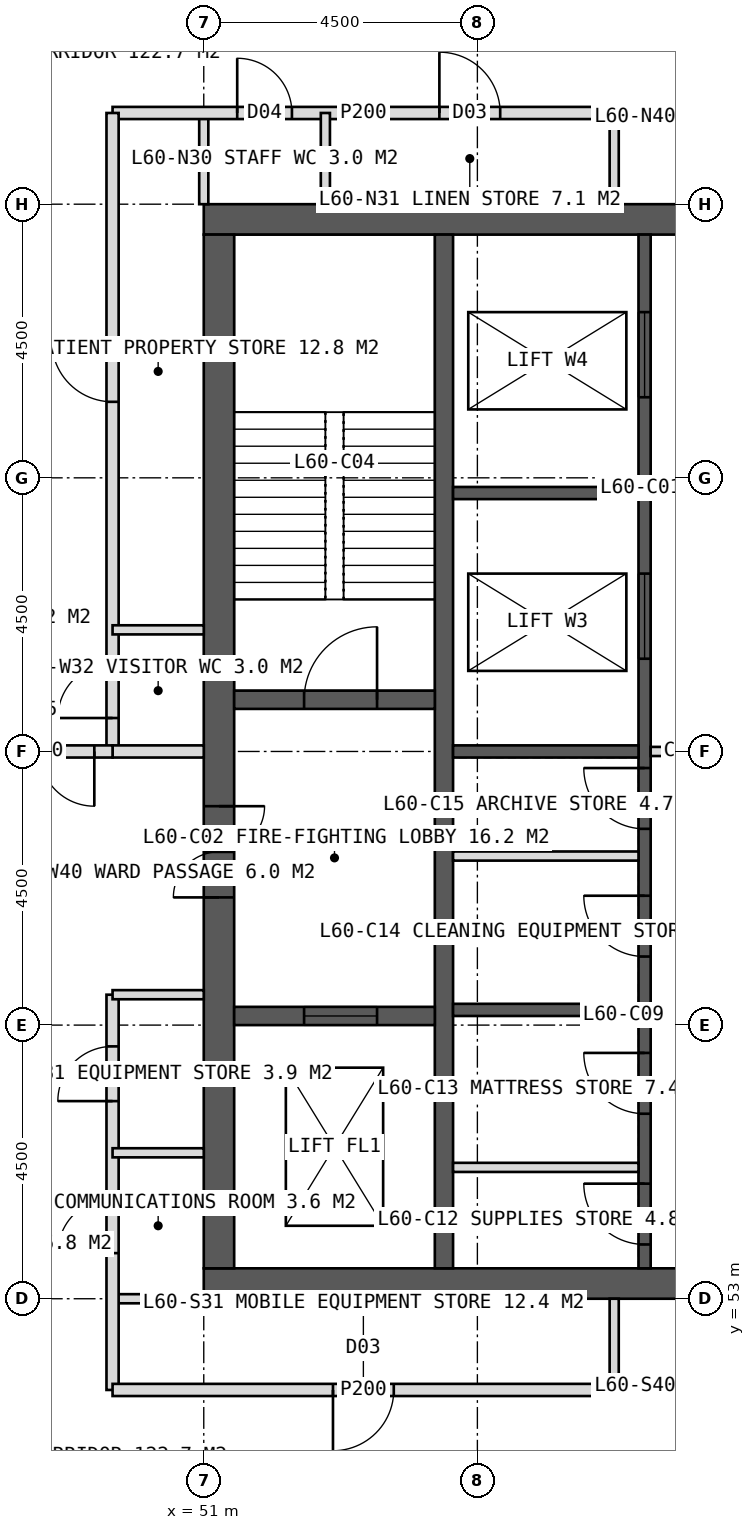
"""IFC4 building model, lengths in metres.
Left out: names, types, materials, properties, quantities, classifications, styles, units other than length and angle.
Written with IfcOpenShell. Run it as: python <this file> out.ifc"""

import sys

from ifc_helpers import new_model, si_unit, direction, frame, frame_2d, origin, place, context, subcontext, project, spatial, rectangle, extrude, element, fill, save


model = new_model("IFC4")
c1 = context("Model", 3, precision=1e-05, world=origin(), true_north=direction((0.0, 1.0)))
c2 = subcontext(c1, "Body", "Model", "MODEL_VIEW")
j1 = project(units=[si_unit("LENGTHUNIT", "METRE"), si_unit("PLANEANGLEUNIT", "RADIAN")], contexts=[c1])
p1 = place(None, origin())
s1 = spatial("IfcSite", under=j1, at=p1, CompositionType="ELEMENT")
p2 = place(p1, origin())
s2 = spatial("IfcBuilding", under=s1, at=p2, CompositionType="ELEMENT")
p3 = place(p2, frame((0.0, 0.0, 250.0)))
s3 = spatial("IfcBuildingStorey", under=s2, at=p3, CompositionType="ELEMENT", Elevation=250.0)
p4 = place(p3, frame((51.0, 70.75, 0.0), z_axis=(0.0, 0.0, 1.0), x_axis=(1.0, 0.0, 0.0)))
e1 = element("IfcWall", 1, at=p4, inside=s3, PredefinedType="SHEAR", context=c2, shape_type="SweptSolid", body=[
    extrude(rectangle(XDim=18.0, YDim=0.5, at=frame_2d((9.0, 0.0))), origin(), (0.0, 0.0, 1.0), 4.0),
])
p5 = place(p4, frame((8.1, 0.0, 0.0)))
e2 = element("IfcOpeningElement", 2, at=p5, cuts=e1, PredefinedType="OPENING", context=c2, shape_type="SweptSolid", body=[
    extrude(rectangle(XDim=1.8, YDim=2.2, at=frame_2d((0.9, 1.1))), frame((0.0, 0.26, 0.0), z_axis=(0.0, -1.0, 0.0), x_axis=(1.0, 0.0, 0.0)), (0.0, 0.0, 1.0), 0.52),
])
p6 = place(p3, frame((51.0, 53.25, 0.0), z_axis=(0.0, 0.0, 1.0), x_axis=(1.0, 0.0, 0.0)))
e3 = element("IfcWall", 3, at=p6, inside=s3, PredefinedType="SHEAR", context=c2, shape_type="SweptSolid", body=[
    extrude(rectangle(XDim=18.0, YDim=0.5, at=frame_2d((9.0, 0.0))), origin(), (0.0, 0.0, 1.0), 4.0),
])
p7 = place(p6, frame((8.1, 0.0, 0.0)))
e4 = element("IfcOpeningElement", 4, at=p7, cuts=e3, PredefinedType="OPENING", context=c2, shape_type="SweptSolid", body=[
    extrude(rectangle(XDim=1.8, YDim=2.2, at=frame_2d((0.9, 1.1))), frame((0.0, 0.26, 0.0), z_axis=(0.0, -1.0, 0.0), x_axis=(1.0, 0.0, 0.0)), (0.0, 0.0, 1.0), 0.52),
])
p8 = place(p3, frame((51.25, 53.5, 0.0), z_axis=(0.0, 0.0, 1.0), x_axis=(0.0, 1.0, 0.0)))
e5 = element("IfcWall", 5, at=p8, inside=s3, PredefinedType="SHEAR", context=c2, shape_type="SweptSolid", body=[
    extrude(rectangle(XDim=17.0, YDim=0.5, at=frame_2d((8.5, 0.0))), origin(), (0.0, 0.0, 1.0), 4.0),
])
p9 = place(p8, frame((6.1, 0.0, 0.0)))
e6 = element("IfcOpeningElement", 6, at=p9, cuts=e5, PredefinedType="OPENING", context=c2, shape_type="SweptSolid", body=[
    extrude(rectangle(XDim=1.5, YDim=2.2, at=frame_2d((0.75, 1.1))), frame((0.0, 0.26, 0.0), z_axis=(0.0, -1.0, 0.0), x_axis=(1.0, 0.0, 0.0)), (0.0, 0.0, 1.0), 0.52),
])
p10 = place(p3, frame((54.95, 53.5, 0.0), z_axis=(0.0, 0.0, 1.0), x_axis=(0.0, 1.0, 0.0)))
e7 = element("IfcWall", 7, at=p10, inside=s3, PredefinedType="SHEAR", context=c2, shape_type="SweptSolid", body=[
    extrude(rectangle(XDim=17.0, YDim=0.3, at=frame_2d((8.5, 0.0))), origin(), (0.0, 0.0, 1.0), 4.0),
])
p11 = place(p3, frame((58.25, 53.5, 0.0), z_axis=(0.0, 0.0, 1.0), x_axis=(0.0, 1.0, 0.0)))
e8 = element("IfcWall", 8, at=p11, inside=s3, PredefinedType="SHEAR", context=c2, shape_type="SweptSolid", body=[
    extrude(rectangle(XDim=17.0, YDim=0.2, at=frame_2d((8.5, 0.0))), origin(), (0.0, 0.0, 1.0), 4.0),
])
p12 = place(p11, frame((0.393, 0.0, 0.0)))
e9 = element("IfcOpeningElement", 9, at=p12, cuts=e8, PredefinedType="OPENING", context=c2, shape_type="SweptSolid", body=[
    extrude(rectangle(XDim=1.0, YDim=2.1, at=frame_2d((0.5, 1.05))), frame((0.0, 0.11, 0.0), z_axis=(0.0, -1.0, 0.0), x_axis=(1.0, 0.0, 0.0)), (0.0, 0.0, 1.0), 0.22),
])
p13 = place(p11, frame((2.542, 0.0, 0.0)))
e10 = element("IfcOpeningElement", 10, at=p13, cuts=e8, PredefinedType="OPENING", context=c2, shape_type="SweptSolid", body=[
    extrude(rectangle(XDim=1.0, YDim=2.1, at=frame_2d((0.5, 1.05))), frame((0.0, 0.11, 0.0), z_axis=(0.0, -1.0, 0.0), x_axis=(1.0, 0.0, 0.0)), (0.0, 0.0, 1.0), 0.22),
])
p14 = place(p11, frame((5.127, 0.0, 0.0)))
e11 = element("IfcOpeningElement", 11, at=p14, cuts=e8, PredefinedType="OPENING", context=c2, shape_type="SweptSolid", body=[
    extrude(rectangle(XDim=1.0, YDim=2.1, at=frame_2d((0.5, 1.05))), frame((0.0, 0.11, 0.0), z_axis=(0.0, -1.0, 0.0), x_axis=(1.0, 0.0, 0.0)), (0.0, 0.0, 1.0), 0.22),
])
p15 = place(p11, frame((7.228, 0.0, 0.0)))
e12 = element("IfcOpeningElement", 12, at=p15, cuts=e8, PredefinedType="OPENING", context=c2, shape_type="SweptSolid", body=[
    extrude(rectangle(XDim=1.0, YDim=2.1, at=frame_2d((0.5, 1.05))), frame((0.0, 0.11, 0.0), z_axis=(0.0, -1.0, 0.0), x_axis=(1.0, 0.0, 0.0)), (0.0, 0.0, 1.0), 0.22),
])
p16 = place(p11, frame((10.025, 0.0, 0.0)))
e13 = element("IfcOpeningElement", 13, at=p16, cuts=e8, PredefinedType="OPENING", context=c2, shape_type="SweptSolid", body=[
    extrude(rectangle(XDim=1.4, YDim=2.2, at=frame_2d((0.7, 1.1))), frame((0.0, 0.11, 0.0), z_axis=(0.0, -1.0, 0.0), x_axis=(1.0, 0.0, 0.0)), (0.0, 0.0, 1.0), 0.22),
])
p17 = place(p11, frame((14.325, 0.0, 0.0)))
e14 = element("IfcOpeningElement", 14, at=p17, cuts=e8, PredefinedType="OPENING", context=c2, shape_type="SweptSolid", body=[
    extrude(rectangle(XDim=1.4, YDim=2.2, at=frame_2d((0.7, 1.1))), frame((0.0, 0.11, 0.0), z_axis=(0.0, -1.0, 0.0), x_axis=(1.0, 0.0, 0.0)), (0.0, 0.0, 1.0), 0.22),
])
for number, where, z_axis, x_axis in (
    (15, (55.1, 57.75, 0.0), (0.0, 0.0, 1.0), (1.0, 0.0, 0.0)),
    (16, (55.1, 62.0, 0.0), (0.0, 0.0, 1.0), (1.0, 0.0, 0.0)),
    (17, (55.1, 66.25, 0.0), (0.0, 0.0, 1.0), (1.0, 0.0, 0.0)),
):
    element("IfcWall", number, at=place(p3, frame(where, z_axis=z_axis, x_axis=x_axis)), inside=s3, PredefinedType="SHEAR", context=c2, shape_type="SweptSolid", body=[
        extrude(rectangle(XDim=3.05, YDim=0.2, at=frame_2d((1.525, 0.0))), origin(), (0.0, 0.0, 1.0), 4.0),
    ])
p18 = place(p3, frame((51.5, 62.85, 0.0), z_axis=(0.0, 0.0, 1.0), x_axis=(1.0, 0.0, 0.0)))
e18 = element("IfcWall", 18, at=p18, inside=s3, PredefinedType="SHEAR", context=c2, shape_type="SweptSolid", body=[
    extrude(rectangle(XDim=3.3, YDim=0.3, at=frame_2d((1.65, 0.0))), origin(), (0.0, 0.0, 1.0), 4.0),
])
p19 = place(p18, frame((1.15, 0.0, 0.0)))
e19 = element("IfcOpeningElement", 19, at=p19, cuts=e18, PredefinedType="OPENING", context=c2, shape_type="SweptSolid", body=[
    extrude(rectangle(XDim=1.2, YDim=2.1, at=frame_2d((0.6, 1.05))), frame((0.0, 0.16, 0.0), z_axis=(0.0, -1.0, 0.0), x_axis=(1.0, 0.0, 0.0)), (0.0, 0.0, 1.0), 0.32),
])
p20 = place(p3, frame((51.5, 57.65, 0.0), z_axis=(0.0, 0.0, 1.0), x_axis=(1.0, 0.0, 0.0)))
e20 = element("IfcWall", 20, at=p20, inside=s3, PredefinedType="SHEAR", context=c2, shape_type="SweptSolid", body=[
    extrude(rectangle(XDim=3.3, YDim=0.3, at=frame_2d((1.65, 0.0))), origin(), (0.0, 0.0, 1.0), 4.0),
])
p21 = place(p20, frame((1.15, 0.0, 0.0)))
e21 = element("IfcOpeningElement", 21, at=p21, cuts=e20, PredefinedType="OPENING", context=c2, shape_type="SweptSolid", body=[
    extrude(rectangle(XDim=1.2, YDim=2.2, at=frame_2d((0.6, 1.1))), frame((0.0, 0.16, 0.0), z_axis=(0.0, -1.0, 0.0), x_axis=(1.0, 0.0, 0.0)), (0.0, 0.0, 1.0), 0.32),
])
p22 = place(p3, frame((51.0, 71.0, 0.0), z_axis=(0.0, 0.0, 1.0), x_axis=(0.0, 1.0, 0.0)))
e22 = element("IfcWall", 22, at=p22, inside=s3, PredefinedType="PARTITIONING", context=c2, shape_type="SweptSolid", body=[
    extrude(rectangle(XDim=1.5, YDim=0.15, at=frame_2d((0.75, 0.0))), origin(), (0.0, 0.0, 1.0), 3.75),
])
p23 = place(p3, frame((49.5, 72.5, 0.0), z_axis=(0.0, 0.0, 1.0), x_axis=(1.0, 0.0, 0.0)))
e23 = element("IfcWall", 23, at=p23, inside=s3, PredefinedType="PARTITIONING", context=c2, shape_type="SweptSolid", body=[
    extrude(rectangle(XDim=8.25, YDim=0.2, at=frame_2d((4.125, 0.0))), origin(), (0.0, 0.0, 1.0), 3.75),
])
p24 = place(p23, frame((2.05, 0.0, 0.0)))
e24 = element("IfcOpeningElement", 24, at=p24, cuts=e23, PredefinedType="OPENING", context=c2, shape_type="SweptSolid", body=[
    extrude(rectangle(XDim=0.9, YDim=2.1, at=frame_2d((0.45, 1.05))), frame((0.0, 0.11, 0.0), z_axis=(0.0, -1.0, 0.0), x_axis=(1.0, 0.0, 0.0)), (0.0, 0.0, 1.0), 0.22),
])
p25 = place(p23, frame((5.375, 0.0, 0.0)))
e25 = element("IfcOpeningElement", 25, at=p25, cuts=e23, PredefinedType="OPENING", context=c2, shape_type="SweptSolid", body=[
    extrude(rectangle(XDim=1.0, YDim=2.1, at=frame_2d((0.5, 1.05))), frame((0.0, 0.11, 0.0), z_axis=(0.0, -1.0, 0.0), x_axis=(1.0, 0.0, 0.0)), (0.0, 0.0, 1.0), 0.22),
])
for number, where, z_axis, x_axis in (
    (26, (57.75, 71.0, 0.0), (0.0, 0.0, 1.0), (0.0, 1.0, 0.0)),
    (27, (53.0, 71.0, 0.0), (0.0, 0.0, 1.0), (0.0, 1.0, 0.0)),
    (28, (51.0, 53.0, 0.0), (0.0, 0.0, 1.0), (-1.0, 0.0, 0.0)),
):
    element("IfcWall", number, at=place(p3, frame(where, z_axis=z_axis, x_axis=x_axis)), inside=s3, PredefinedType="PARTITIONING", context=c2, shape_type="SweptSolid", body=[
        extrude(rectangle(XDim=1.5, YDim=0.15, at=frame_2d((0.75, 0.0))), origin(), (0.0, 0.0, 1.0), 3.75),
    ])
p26 = place(p3, frame((49.5, 51.5, 0.0), z_axis=(0.0, 0.0, 1.0), x_axis=(0.0, 1.0, 0.0)))
e29 = element("IfcWall", 29, at=p26, inside=s3, PredefinedType="PARTITIONING", context=c2, shape_type="SweptSolid", body=[
    extrude(rectangle(XDim=6.5, YDim=0.2, at=frame_2d((3.25, 0.0))), origin(), (0.0, 0.0, 1.0), 3.75),
])
p27 = place(p26, frame((2.25, 0.0, 0.0)))
e30 = element("IfcOpeningElement", 30, at=p27, cuts=e29, PredefinedType="OPENING", context=c2, shape_type="SweptSolid", body=[
    extrude(rectangle(XDim=0.9, YDim=2.1, at=frame_2d((0.45, 1.05))), frame((0.0, 0.11, 0.0), z_axis=(0.0, -1.0, 0.0), x_axis=(1.0, 0.0, 0.0)), (0.0, 0.0, 1.0), 0.22),
])
p28 = place(p26, frame((4.75, 0.0, 0.0)))
e31 = element("IfcOpeningElement", 31, at=p28, cuts=e29, PredefinedType="OPENING", context=c2, shape_type="SweptSolid", body=[
    extrude(rectangle(XDim=0.9, YDim=2.1, at=frame_2d((0.45, 1.05))), frame((0.0, 0.11, 0.0), z_axis=(0.0, -1.0, 0.0), x_axis=(1.0, 0.0, 0.0)), (0.0, 0.0, 1.0), 0.22),
])
p29 = place(p3, frame((49.5, 62.0, 0.0), z_axis=(0.0, 0.0, 1.0), x_axis=(0.0, 1.0, 0.0)))
e32 = element("IfcWall", 32, at=p29, inside=s3, PredefinedType="PARTITIONING", context=c2, shape_type="SweptSolid", body=[
    extrude(rectangle(XDim=10.5, YDim=0.2, at=frame_2d((5.25, 0.0))), origin(), (0.0, 0.0, 1.0), 3.75),
])
p30 = place(p29, frame((0.55, 0.0, 0.0)))
e33 = element("IfcOpeningElement", 33, at=p30, cuts=e32, PredefinedType="OPENING", context=c2, shape_type="SweptSolid", body=[
    extrude(rectangle(XDim=0.9, YDim=2.1, at=frame_2d((0.45, 1.05))), frame((0.0, 0.11, 0.0), z_axis=(0.0, -1.0, 0.0), x_axis=(1.0, 0.0, 0.0)), (0.0, 0.0, 1.0), 0.22),
])
p31 = place(p29, frame((5.75, 0.0, 0.0)))
e34 = element("IfcOpeningElement", 34, at=p31, cuts=e32, PredefinedType="OPENING", context=c2, shape_type="SweptSolid", body=[
    extrude(rectangle(XDim=1.0, YDim=2.1, at=frame_2d((0.5, 1.05))), frame((0.0, 0.11, 0.0), z_axis=(0.0, -1.0, 0.0), x_axis=(1.0, 0.0, 0.0)), (0.0, 0.0, 1.0), 0.22),
])
p32 = place(p3, frame((51.0, 58.0, 0.0), z_axis=(0.0, 0.0, 1.0), x_axis=(-1.0, 0.0, 0.0)))
e35 = element("IfcWall", 35, at=p32, inside=s3, PredefinedType="PARTITIONING", context=c2, shape_type="SweptSolid", body=[
    extrude(rectangle(XDim=1.5, YDim=0.15, at=frame_2d((0.75, 0.0))), origin(), (0.0, 0.0, 1.0), 3.75),
])
p33 = place(p3, frame((51.0, 62.0, 0.0), z_axis=(0.0, 0.0, 1.0), x_axis=(-1.0, 0.0, 0.0)))
e36 = element("IfcWall", 36, at=p33, inside=s3, PredefinedType="SOLIDWALL", context=c2, shape_type="SweptSolid", body=[
    extrude(rectangle(XDim=1.5, YDim=0.2, at=frame_2d((0.75, 0.0))), origin(), (0.0, 0.0, 1.0), 2.75),
])
for number, where, z_axis, x_axis in (
    (37, (51.0, 55.4, 0.0), (0.0, 0.0, 1.0), (-1.0, 0.0, 0.0)),
    (38, (51.0, 64.0, 0.0), (0.0, 0.0, 1.0), (-1.0, 0.0, 0.0)),
):
    element("IfcWall", number, at=place(p3, frame(where, z_axis=z_axis, x_axis=x_axis)), inside=s3, PredefinedType="PARTITIONING", context=c2, shape_type="SweptSolid", body=[
        extrude(rectangle(XDim=1.5, YDim=0.15, at=frame_2d((0.75, 0.0))), origin(), (0.0, 0.0, 1.0), 3.75),
    ])
p34 = place(p3, frame((57.75, 51.5, 0.0), z_axis=(0.0, 0.0, 1.0), x_axis=(-1.0, 0.0, 0.0)))
e39 = element("IfcWall", 39, at=p34, inside=s3, PredefinedType="PARTITIONING", context=c2, shape_type="SweptSolid", body=[
    extrude(rectangle(XDim=8.25, YDim=0.2, at=frame_2d((4.125, 0.0))), origin(), (0.0, 0.0, 1.0), 3.75),
])
p35 = place(p34, frame((3.625, 0.0, 0.0)))
e40 = element("IfcOpeningElement", 40, at=p35, cuts=e39, PredefinedType="OPENING", context=c2, shape_type="SweptSolid", body=[
    extrude(rectangle(XDim=1.0, YDim=2.1, at=frame_2d((0.5, 1.05))), frame((0.0, 0.11, 0.0), z_axis=(0.0, -1.0, 0.0), x_axis=(1.0, 0.0, 0.0)), (0.0, 0.0, 1.0), 0.22),
])
p36 = place(p3, frame((57.75, 53.0, 0.0), z_axis=(0.0, 0.0, 1.0), x_axis=(0.0, -1.0, 0.0)))
e41 = element("IfcWall", 41, at=p36, inside=s3, PredefinedType="PARTITIONING", context=c2, shape_type="SweptSolid", body=[
    extrude(rectangle(XDim=1.5, YDim=0.15, at=frame_2d((0.75, 0.0))), origin(), (0.0, 0.0, 1.0), 3.75),
])
p37 = place(p3, frame((49.5, 62.0, 0.0), z_axis=(0.0, 0.0, 1.0), x_axis=(-1.0, 0.0, 0.0)))
e42 = element("IfcWall", 42, at=p37, inside=s3, PredefinedType="SOLIDWALL", context=c2, shape_type="SweptSolid", body=[
    extrude(rectangle(XDim=2.6, YDim=0.2, at=frame_2d((1.3, 0.0))), origin(), (0.0, 0.0, 1.0), 2.75),
])
p38 = place(p37, frame((0.3, 0.0, 0.0)))
e43 = element("IfcOpeningElement", 43, at=p38, cuts=e42, PredefinedType="OPENING", context=c2, shape_type="SweptSolid", body=[
    extrude(rectangle(XDim=1.8, YDim=2.2, at=frame_2d((0.9, 1.1))), frame((0.0, 0.11, 0.0), z_axis=(0.0, -1.0, 0.0), x_axis=(1.0, 0.0, 0.0)), (0.0, 0.0, 1.0), 0.22),
])
for number, where, z_axis, x_axis in (
    (44, (55.1, 55.16, 0.0), (0.0, 0.0, 1.0), (1.0, 0.0, 0.0)),
    (45, (55.1, 60.28, 0.0), (0.0, 0.0, 1.0), (1.0, 0.0, 0.0)),
):
    element("IfcWall", number, at=place(p3, frame(where, z_axis=z_axis, x_axis=x_axis)), inside=s3, PredefinedType="PARTITIONING", context=c2, shape_type="SweptSolid", body=[
        extrude(rectangle(XDim=3.05, YDim=0.15, at=frame_2d((1.525, 0.0))), origin(), (0.0, 0.0, 1.0), 3.75),
    ])
p39 = place(p3, frame((58.35, 62.0, 0.0), z_axis=(0.0, 0.0, 1.0), x_axis=(1.0, 0.0, 0.0)))
e46 = element("IfcWall", 46, at=p39, inside=s3, PredefinedType="PARTITIONING", context=c2, shape_type="SweptSolid", body=[
    extrude(rectangle(XDim=3.3, YDim=0.15, at=frame_2d((1.65, 0.0))), origin(), (0.0, 0.0, 1.0), 3.75),
])
p40 = place(p24, origin())
e47 = element("IfcDoor", 47, at=p40, inside=s3, OperationType="SINGLE_SWING_LEFT", PredefinedType="DOOR", context=c2, shape_type="SweptSolid", body=[
    extrude(rectangle(XDim=0.9, YDim=2.1, at=frame_2d((0.45, 1.05))), frame((0.0, 0.025, 0.0), z_axis=(0.0, -1.0, 0.0), x_axis=(1.0, 0.0, 0.0)), (0.0, 0.0, 1.0), 0.05),
])
fill(e24, e47)
p41 = place(p25, origin())
e48 = element("IfcDoor", 48, at=p41, inside=s3, OperationType="SINGLE_SWING_LEFT", PredefinedType="DOOR", context=c2, shape_type="SweptSolid", body=[
    extrude(rectangle(XDim=1.0, YDim=2.1, at=frame_2d((0.5, 1.05))), frame((0.0, 0.025, 0.0), z_axis=(0.0, -1.0, 0.0), x_axis=(1.0, 0.0, 0.0)), (0.0, 0.0, 1.0), 0.05),
])
fill(e25, e48)
p42 = place(p27, origin())
e49 = element("IfcDoor", 49, at=p42, inside=s3, OperationType="SINGLE_SWING_LEFT", PredefinedType="DOOR", context=c2, shape_type="SweptSolid", body=[
    extrude(rectangle(XDim=0.9, YDim=2.1, at=frame_2d((0.45, 1.05))), frame((0.0, 0.025, 0.0), z_axis=(0.0, -1.0, 0.0), x_axis=(1.0, 0.0, 0.0)), (0.0, 0.0, 1.0), 0.05),
])
fill(e30, e49)
p43 = place(p28, origin())
e50 = element("IfcDoor", 50, at=p43, inside=s3, OperationType="SINGLE_SWING_LEFT", PredefinedType="DOOR", context=c2, shape_type="SweptSolid", body=[
    extrude(rectangle(XDim=0.9, YDim=2.1, at=frame_2d((0.45, 1.05))), frame((0.0, 0.025, 0.0), z_axis=(0.0, -1.0, 0.0), x_axis=(1.0, 0.0, 0.0)), (0.0, 0.0, 1.0), 0.05),
])
fill(e31, e50)
p44 = place(p30, origin())
e51 = element("IfcDoor", 51, at=p44, inside=s3, OperationType="SINGLE_SWING_LEFT", PredefinedType="DOOR", context=c2, shape_type="SweptSolid", body=[
    extrude(rectangle(XDim=0.9, YDim=2.1, at=frame_2d((0.45, 1.05))), frame((0.0, 0.025, 0.0), z_axis=(0.0, -1.0, 0.0), x_axis=(1.0, 0.0, 0.0)), (0.0, 0.0, 1.0), 0.05),
])
fill(e33, e51)
p45 = place(p31, origin())
e52 = element("IfcDoor", 52, at=p45, inside=s3, OperationType="SINGLE_SWING_RIGHT", PredefinedType="DOOR", context=c2, shape_type="SweptSolid", body=[
    extrude(rectangle(XDim=1.0, YDim=2.1, at=frame_2d((0.5, 1.05))), frame((0.0, 0.025, 0.0), z_axis=(0.0, -1.0, 0.0), x_axis=(1.0, 0.0, 0.0)), (0.0, 0.0, 1.0), 0.05),
])
fill(e34, e52)
p46 = place(p35, origin())
e53 = element("IfcDoor", 53, at=p46, inside=s3, OperationType="SINGLE_SWING_RIGHT", PredefinedType="DOOR", context=c2, shape_type="SweptSolid", body=[
    extrude(rectangle(XDim=1.0, YDim=2.1, at=frame_2d((0.5, 1.05))), frame((0.0, 0.025, 0.0), z_axis=(0.0, -1.0, 0.0), x_axis=(1.0, 0.0, 0.0)), (0.0, 0.0, 1.0), 0.05),
])
fill(e40, e53)
p47 = place(p38, origin())
e54 = element("IfcDoor", 54, at=p47, inside=s3, OperationType="DOUBLE_DOOR_DOUBLE_SWING", PredefinedType="DOOR", context=c2, shape_type="SweptSolid", body=[
    extrude(rectangle(XDim=1.8, YDim=2.2, at=frame_2d((0.9, 1.1))), frame((0.0, 0.025, 0.0), z_axis=(0.0, -1.0, 0.0), x_axis=(1.0, 0.0, 0.0)), (0.0, 0.0, 1.0), 0.05),
])
fill(e43, e54)
p48 = place(p9, origin())
e55 = element("IfcDoor", 55, at=p48, inside=s3, OperationType="DOUBLE_DOOR_SINGLE_SWING", PredefinedType="DOOR", context=c2, shape_type="SweptSolid", body=[
    extrude(rectangle(XDim=1.5, YDim=2.2, at=frame_2d((0.75, 1.1))), frame((0.0, 0.025, 0.0), z_axis=(0.0, -1.0, 0.0), x_axis=(1.0, 0.0, 0.0)), (0.0, 0.0, 1.0), 0.05),
])
fill(e6, e55)
p49 = place(p19, origin())
e56 = element("IfcDoor", 56, at=p49, inside=s3, OperationType="SINGLE_SWING_RIGHT", PredefinedType="DOOR", context=c2, shape_type="SweptSolid", body=[
    extrude(rectangle(XDim=1.2, YDim=2.1, at=frame_2d((0.6, 1.05))), frame((0.0, 0.025, 0.0), z_axis=(0.0, -1.0, 0.0), x_axis=(1.0, 0.0, 0.0)), (0.0, 0.0, 1.0), 0.05),
])
fill(e19, e56)
p50 = place(p21, origin())
e57 = element("IfcDoor", 57, at=p50, inside=s3, OperationType="SLIDING_TO_LEFT", PredefinedType="DOOR", context=c2, shape_type="SweptSolid", body=[
    extrude(rectangle(XDim=1.2, YDim=2.2, at=frame_2d((0.6, 1.1))), frame((0.0, 0.025, 0.0), z_axis=(0.0, -1.0, 0.0), x_axis=(1.0, 0.0, 0.0)), (0.0, 0.0, 1.0), 0.05),
])
fill(e21, e57)
p51 = place(p12, origin())
e58 = element("IfcDoor", 58, at=p51, inside=s3, OperationType="SINGLE_SWING_RIGHT", PredefinedType="DOOR", context=c2, shape_type="SweptSolid", body=[
    extrude(rectangle(XDim=1.0, YDim=2.1, at=frame_2d((0.5, 1.05))), frame((0.0, 0.025, 0.0), z_axis=(0.0, -1.0, 0.0), x_axis=(1.0, 0.0, 0.0)), (0.0, 0.0, 1.0), 0.05),
])
fill(e9, e58)
p52 = place(p13, origin())
e59 = element("IfcDoor", 59, at=p52, inside=s3, OperationType="SINGLE_SWING_RIGHT", PredefinedType="DOOR", context=c2, shape_type="SweptSolid", body=[
    extrude(rectangle(XDim=1.0, YDim=2.1, at=frame_2d((0.5, 1.05))), frame((0.0, 0.025, 0.0), z_axis=(0.0, -1.0, 0.0), x_axis=(1.0, 0.0, 0.0)), (0.0, 0.0, 1.0), 0.05),
])
fill(e10, e59)
p53 = place(p14, origin())
e60 = element("IfcDoor", 60, at=p53, inside=s3, OperationType="SINGLE_SWING_RIGHT", PredefinedType="DOOR", context=c2, shape_type="SweptSolid", body=[
    extrude(rectangle(XDim=1.0, YDim=2.1, at=frame_2d((0.5, 1.05))), frame((0.0, 0.025, 0.0), z_axis=(0.0, -1.0, 0.0), x_axis=(1.0, 0.0, 0.0)), (0.0, 0.0, 1.0), 0.05),
])
fill(e11, e60)
p54 = place(p15, origin())
e61 = element("IfcDoor", 61, at=p54, inside=s3, OperationType="SINGLE_SWING_RIGHT", PredefinedType="DOOR", context=c2, shape_type="SweptSolid", body=[
    extrude(rectangle(XDim=1.0, YDim=2.1, at=frame_2d((0.5, 1.05))), frame((0.0, 0.025, 0.0), z_axis=(0.0, -1.0, 0.0), x_axis=(1.0, 0.0, 0.0)), (0.0, 0.0, 1.0), 0.05),
])
fill(e12, e61)
p55 = place(p16, origin())
e62 = element("IfcDoor", 62, at=p55, inside=s3, OperationType="SLIDING_TO_LEFT", PredefinedType="DOOR", context=c2, shape_type="SweptSolid", body=[
    extrude(rectangle(XDim=1.4, YDim=2.2, at=frame_2d((0.7, 1.1))), frame((0.0, 0.025, 0.0), z_axis=(0.0, -1.0, 0.0), x_axis=(1.0, 0.0, 0.0)), (0.0, 0.0, 1.0), 0.05),
])
fill(e13, e62)
p56 = place(p17, origin())
e63 = element("IfcDoor", 63, at=p56, inside=s3, OperationType="SLIDING_TO_LEFT", PredefinedType="DOOR", context=c2, shape_type="SweptSolid", body=[
    extrude(rectangle(XDim=1.4, YDim=2.2, at=frame_2d((0.7, 1.1))), frame((0.0, 0.025, 0.0), z_axis=(0.0, -1.0, 0.0), x_axis=(1.0, 0.0, 0.0)), (0.0, 0.0, 1.0), 0.05),
])
fill(e14, e63)
save(model, sys.argv[1])
